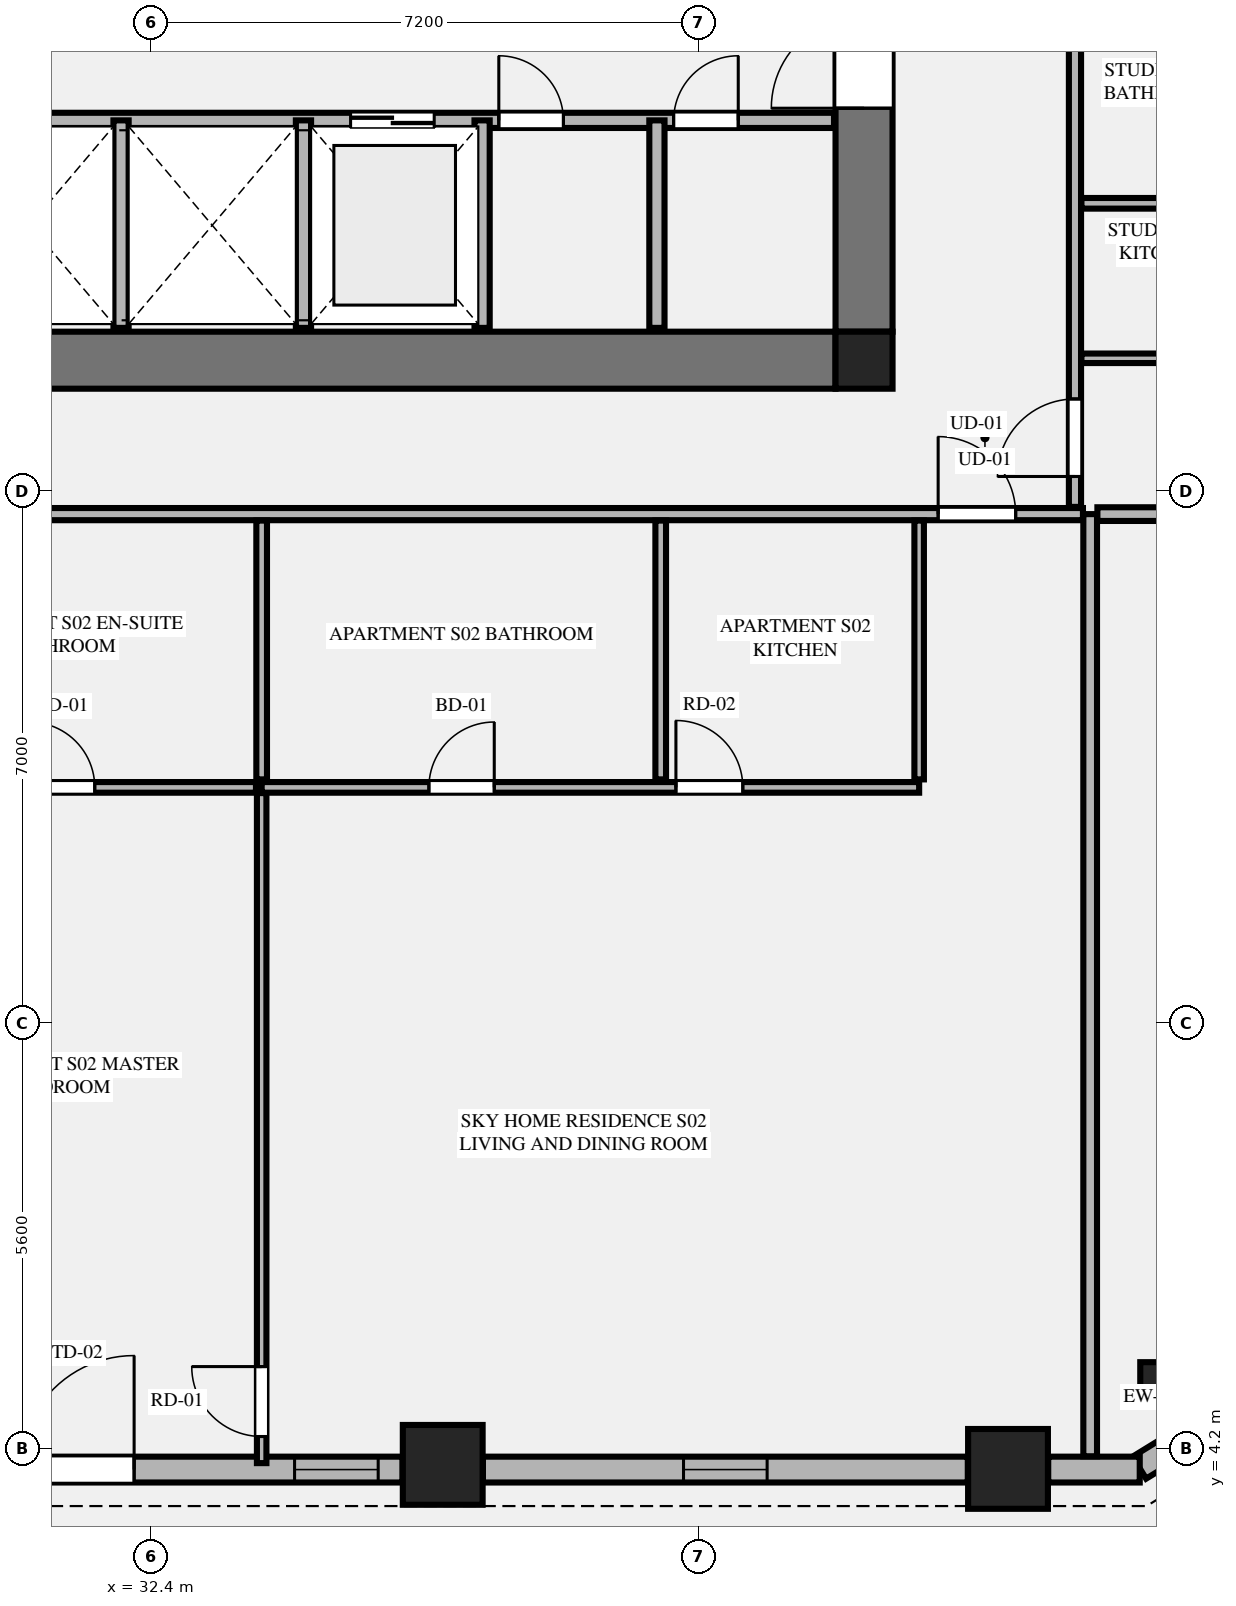
"""IFC4 building model, lengths in metres.
Left out: names, types, materials, properties, quantities, classifications, styles, units other than length and angle.
Written with IfcOpenShell. Run it as: python <this file> out.ifc"""

import sys

from ifc_helpers import new_model, si_unit, direction, frame, frame_2d, origin, origin_2d, place, context, subcontext, project, spatial, rectangle, extrude, element, fill, save


model = new_model("IFC4")
c1 = context("Model", 3, precision=1e-05, world=origin(), true_north=direction((0.0, 1.0)))
c2 = subcontext(c1, "Body", "Model", "MODEL_VIEW")
j1 = project(units=[si_unit("LENGTHUNIT", "METRE"), si_unit("PLANEANGLEUNIT", "RADIAN")], contexts=[c1])
p1 = place(None, origin())
s1 = spatial("IfcSite", under=j1, at=p1, CompositionType="ELEMENT")
p2 = place(p1, origin())
s2 = spatial("IfcBuilding", under=s1, at=p2, CompositionType="ELEMENT")
p3 = place(p2, frame((0.0, 0.0, 98.4)))
s3 = spatial("IfcBuildingStorey", under=s2, at=p3, CompositionType="ELEMENT", Elevation=98.4)
p4 = place(p3, frame((41.775, 18.525, 0.0), z_axis=(0.0, 0.0, 1.0), x_axis=(1.0, 0.0, 0.0)))
e1 = element("IfcColumn", 1, at=p4, inside=s3, PredefinedType="COLUMN", context=c2, shape_type="SweptSolid", body=[
    extrude(rectangle(XDim=0.75, YDim=0.75, at=origin_2d()), origin(), (0.0, 0.0, 1.0), 3.55),
])
p5 = place(p3, frame((23.4, 18.525, 0.0), z_axis=(0.0, 0.0, 1.0), x_axis=(1.0, 0.0, 0.0)))
e2 = element("IfcWall", 2, at=p5, inside=s3, PredefinedType="SHEAR", context=c2, shape_type="SweptSolid", body=[
    extrude(rectangle(XDim=18.0, YDim=0.75, at=frame_2d((9.0, 0.0))), origin(), (0.0, 0.0, 1.0), 3.34),
])
p6 = place(p3, frame((41.775, 18.9, 0.0), z_axis=(0.0, 0.0, 1.0), x_axis=(0.0, 1.0, 0.0)))
e3 = element("IfcWall", 3, at=p6, inside=s3, PredefinedType="SHEAR", context=c2, shape_type="SweptSolid", body=[
    extrude(rectangle(XDim=14.0, YDim=0.75, at=frame_2d((7.0, 0.0))), origin(), (0.0, 0.0, 1.0), 3.34),
])
p7 = place(p6, frame((2.94, 0.0, 0.0)))
e4 = element("IfcOpeningElement", 4, at=p7, cuts=e3, PredefinedType="OPENING", context=c2, shape_type="SweptSolid", body=[
    extrude(rectangle(XDim=1.22, YDim=2.25, at=frame_2d((0.61, 1.125))), frame((0.0, 0.385, 0.0), z_axis=(0.0, -1.0, 0.0), x_axis=(1.0, 0.0, 0.0)), (0.0, 0.0, 1.0), 0.77),
])
for number, where, z_axis, x_axis in (
    (5, (36.232, 3.992, 0.0), (0.0, 0.0, 1.0), (1.0, 0.0, 0.0)),
    (6, (43.669, 3.939, 0.0), (0.0, 0.0, 1.0), (1.0, 0.0, 0.0)),
):
    element("IfcColumn", number, at=place(p3, frame(where, z_axis=z_axis, x_axis=x_axis)), inside=s3, PredefinedType="COLUMN", context=c2, shape_type="SweptSolid", body=[
        extrude(rectangle(XDim=1.05, YDim=1.05, at=origin_2d()), origin(), (0.0, 0.0, 1.0), 3.55),
    ])
p8 = place(p3, frame((45.659, 5.093, 0.0), z_axis=(0.0, 0.0, 1.0), x_axis=(0.865160173452, 0.501495637342, 0.0)))
e7 = element("IfcColumn", 7, at=p8, inside=s3, PredefinedType="PILASTER", context=c2, shape_type="SweptSolid", body=[
    extrude(rectangle(XDim=0.5, YDim=0.35, at=origin_2d()), origin(), (0.0, 0.0, 1.0), 3.55),
])
p9 = place(p3, frame((23.42, 21.68, 0.0), z_axis=(0.0, 0.0, 1.0), x_axis=(1.0, 0.0, 0.0)))
e8 = element("IfcWall", 8, at=p9, inside=s3, PredefinedType="PLUMBINGWALL", context=c2, shape_type="SweptSolid", body=[
    extrude(rectangle(XDim=17.96, YDim=0.2, at=frame_2d((8.98, 0.0))), origin(), (0.0, 0.0, 1.0), 3.34),
])
p10 = place(p9, frame((11.6, 0.0, 0.0)))
e9 = element("IfcOpeningElement", 9, at=p10, cuts=e8, PredefinedType="OPENING", context=c2, shape_type="SweptSolid", body=[
    extrude(rectangle(XDim=1.1, YDim=2.2, at=frame_2d((0.55, 1.1))), frame((0.0, 0.11, 0.0), z_axis=(0.0, -1.0, 0.0), x_axis=(1.0, 0.0, 0.0)), (0.0, 0.0, 1.0), 0.22),
])
p11 = place(p9, frame((1.2, 0.0, 0.0)))
e10 = element("IfcOpeningElement", 10, at=p11, cuts=e8, PredefinedType="OPENING", context=c2, shape_type="SweptSolid", body=[
    extrude(rectangle(XDim=0.85, YDim=2.05, at=frame_2d((0.425, 1.025))), frame((0.0, 0.11, 0.0), z_axis=(0.0, -1.0, 0.0), x_axis=(1.0, 0.0, 0.0)), (0.0, 0.0, 1.0), 0.22),
])
p12 = place(p9, frame((13.55, 0.0, 0.0)))
e11 = element("IfcOpeningElement", 11, at=p12, cuts=e8, PredefinedType="OPENING", context=c2, shape_type="SweptSolid", body=[
    extrude(rectangle(XDim=0.85, YDim=2.05, at=frame_2d((0.425, 1.025))), frame((0.0, 0.11, 0.0), z_axis=(0.0, -1.0, 0.0), x_axis=(1.0, 0.0, 0.0)), (0.0, 0.0, 1.0), 0.22),
])
p13 = place(p9, frame((15.85, 0.0, 0.0)))
e12 = element("IfcOpeningElement", 12, at=p13, cuts=e8, PredefinedType="OPENING", context=c2, shape_type="SweptSolid", body=[
    extrude(rectangle(XDim=0.85, YDim=2.05, at=frame_2d((0.425, 1.025))), frame((0.0, 0.11, 0.0), z_axis=(0.0, -1.0, 0.0), x_axis=(1.0, 0.0, 0.0)), (0.0, 0.0, 1.0), 0.22),
])
for number, where, z_axis, x_axis in (
    (13, (32.0, 18.95, 0.0), (0.0, 0.0, 1.0), (0.0, 1.0, 0.0)),
    (14, (34.4, 18.95, 0.0), (0.0, 0.0, 1.0), (0.0, 1.0, 0.0)),
    (15, (36.75, 18.95, 0.0), (0.0, 0.0, 1.0), (0.0, 1.0, 0.0)),
    (16, (39.05, 18.95, 0.0), (0.0, 0.0, 1.0), (0.0, 1.0, 0.0)),
):
    element("IfcWall", number, at=place(p3, frame(where, z_axis=z_axis, x_axis=x_axis)), inside=s3, PredefinedType="PLUMBINGWALL", context=c2, shape_type="SweptSolid", body=[
        extrude(rectangle(XDim=2.73, YDim=0.2, at=frame_2d((1.365, 0.0))), origin(), (0.0, 0.0, 1.0), 3.34),
    ])
p14 = place(p3, frame((45.397, 3.955, 0.0), z_axis=(0.0, 0.0, 1.0), x_axis=(0.851798915137, 0.523868884523, 0.0)))
e17 = element("IfcWall", 17, at=p14, inside=s3, PredefinedType="STANDARD", context=c2, shape_type="SweptSolid", body=[
    extrude(rectangle(XDim=1.848, YDim=0.34, at=frame_2d((0.924, 0.0))), origin(), (0.0, 0.0, 1.0), 3.34),
])
p15 = place(p3, frame((29.097, 3.93, 0.0), z_axis=(0.0, 0.0, 1.0), x_axis=(1.0, 0.0, 0.0)))
e18 = element("IfcWall", 18, at=p15, inside=s3, PredefinedType="STANDARD", context=c2, shape_type="SweptSolid", body=[
    extrude(rectangle(XDim=6.606, YDim=0.34, at=frame_2d((3.303, 0.0))), origin(), (0.0, 0.0, 1.0), 2.797),
])
p16 = place(p15, frame((1.575, 0.0, 0.0)))
e19 = element("IfcOpeningElement", 19, at=p16, cuts=e18, PredefinedType="OPENING", context=c2, shape_type="SweptSolid", body=[
    extrude(rectangle(XDim=1.5, YDim=2.3, at=frame_2d((0.75, 1.15))), frame((0.0, 0.18, 0.0), z_axis=(0.0, -1.0, 0.0), x_axis=(1.0, 0.0, 0.0)), (0.0, 0.0, 1.0), 0.36),
])
p17 = place(p15, frame((5.186, 0.0, 0.75)))
e20 = element("IfcOpeningElement", 20, at=p17, cuts=e18, PredefinedType="OPENING", context=c2, shape_type="SweptSolid", body=[
    extrude(rectangle(XDim=1.1, YDim=1.897, at=frame_2d((0.55, 0.948))), frame((0.0, 0.18, 0.0), z_axis=(0.0, -1.0, 0.0), x_axis=(1.0, 0.0, 0.0)), (0.0, 0.0, 1.0), 0.36),
])
p18 = place(p3, frame((36.761, 3.93, 0.0), z_axis=(0.0, 0.0, 1.0), x_axis=(1.0, 0.0, 0.0)))
e21 = element("IfcWall", 21, at=p18, inside=s3, PredefinedType="STANDARD", context=c2, shape_type="SweptSolid", body=[
    extrude(rectangle(XDim=6.379, YDim=0.34, at=frame_2d((3.189, 0.0))), origin(), (0.0, 0.0, 1.0), 2.797),
])
p19 = place(p18, frame((2.639, 0.0, 0.75)))
e22 = element("IfcOpeningElement", 22, at=p19, cuts=e21, PredefinedType="OPENING", context=c2, shape_type="SweptSolid", body=[
    extrude(rectangle(XDim=1.1, YDim=1.897, at=frame_2d((0.55, 0.948))), frame((0.0, 0.18, 0.0), z_axis=(0.0, -1.0, 0.0), x_axis=(1.0, 0.0, 0.0)), (0.0, 0.0, 1.0), 0.36),
])
p20 = place(p3, frame((44.198, 3.93, 0.0), z_axis=(0.0, 0.0, 1.0), x_axis=(1.0, 0.0, 0.0)))
e23 = element("IfcWall", 23, at=p20, inside=s3, PredefinedType="STANDARD", context=c2, shape_type="SweptSolid", body=[
    extrude(rectangle(XDim=1.204, YDim=0.34, at=frame_2d((0.602, 0.0))), origin(), (0.0, 0.0, 1.0), 3.34),
])
p21 = place(p3, frame((44.75, 4.105, 0.0), z_axis=(0.0, 0.0, 1.0), x_axis=(0.0, 1.0, 0.0)))
e24 = element("IfcWall", 24, at=p21, inside=s3, PredefinedType="PARTITIONING", context=c2, shape_type="SweptSolid", body=[
    extrude(rectangle(XDim=12.395, YDim=0.18, at=frame_2d((6.198, 0.0))), origin(), (0.0, 0.0, 1.0), 3.34),
])
p22 = place(p3, frame((28.663, 16.5, 0.0), z_axis=(0.0, 0.0, 1.0), x_axis=(1.0, 0.0, 0.0)))
e25 = element("IfcWall", 25, at=p22, inside=s3, PredefinedType="PARTITIONING", context=c2, shape_type="SweptSolid", body=[
    extrude(rectangle(XDim=15.992, YDim=0.16, at=frame_2d((7.996, 0.0))), origin(), (0.0, 0.0, 1.0), 3.34),
])
p23 = place(p22, frame((14.087, 0.0, 0.0)))
e26 = element("IfcOpeningElement", 26, at=p23, cuts=e25, PredefinedType="OPENING", context=c2, shape_type="SweptSolid", body=[
    extrude(rectangle(XDim=1.02, YDim=2.25, at=frame_2d((0.51, 1.125))), frame((0.0, 0.09, 0.0), z_axis=(0.0, -1.0, 0.0), x_axis=(1.0, 0.0, 0.0)), (0.0, 0.0, 1.0), 0.18),
])
p24 = place(p3, frame((42.5, 13.01, 0.0), z_axis=(0.0, 0.0, 1.0), x_axis=(0.0, 1.0, 0.0)))
e27 = element("IfcWall", 27, at=p24, inside=s3, PredefinedType="PARTITIONING", context=c2, shape_type="SweptSolid", body=[
    extrude(rectangle(XDim=3.405, YDim=0.125, at=frame_2d((1.703, 0.0))), origin(), (0.0, 0.0, 1.0), 2.722),
])
p25 = place(p3, frame((33.85, 12.905, 0.0), z_axis=(0.0, 0.0, 1.0), x_axis=(1.0, 0.0, 0.0)))
e28 = element("IfcWall", 28, at=p25, inside=s3, PredefinedType="PLUMBINGWALL", context=c2, shape_type="SweptSolid", body=[
    extrude(rectangle(XDim=8.65, YDim=0.14, at=frame_2d((4.325, 0.0))), origin(), (0.0, 0.0, 1.0), 3.34),
])
p26 = place(p25, frame((2.2, 0.0, 0.0)))
e29 = element("IfcOpeningElement", 29, at=p26, cuts=e28, PredefinedType="OPENING", context=c2, shape_type="SweptSolid", body=[
    extrude(rectangle(XDim=0.86, YDim=2.1, at=frame_2d((0.43, 1.05))), frame((0.0, 0.08, 0.0), z_axis=(0.0, -1.0, 0.0), x_axis=(1.0, 0.0, 0.0)), (0.0, 0.0, 1.0), 0.16),
])
p27 = place(p25, frame((5.45, 0.0, 0.0)))
e30 = element("IfcOpeningElement", 30, at=p27, cuts=e28, PredefinedType="OPENING", context=c2, shape_type="SweptSolid", body=[
    extrude(rectangle(XDim=0.88, YDim=2.15, at=frame_2d((0.44, 1.075))), frame((0.0, 0.08, 0.0), z_axis=(0.0, -1.0, 0.0), x_axis=(1.0, 0.0, 0.0)), (0.0, 0.0, 1.0), 0.16),
])
p28 = place(p3, frame((28.663, 12.905, 0.0), z_axis=(0.0, 0.0, 1.0), x_axis=(1.0, 0.0, 0.0)))
e31 = element("IfcWall", 31, at=p28, inside=s3, PredefinedType="PLUMBINGWALL", context=c2, shape_type="SweptSolid", body=[
    extrude(rectangle(XDim=5.112, YDim=0.14, at=frame_2d((2.556, 0.0))), origin(), (0.0, 0.0, 1.0), 3.34),
])
p29 = place(p28, frame((2.131, 0.0, 0.0)))
e32 = element("IfcOpeningElement", 32, at=p29, cuts=e31, PredefinedType="OPENING", context=c2, shape_type="SweptSolid", body=[
    extrude(rectangle(XDim=0.86, YDim=2.1, at=frame_2d((0.43, 1.05))), frame((0.0, 0.08, 0.0), z_axis=(0.0, -1.0, 0.0), x_axis=(1.0, 0.0, 0.0)), (0.0, 0.0, 1.0), 0.16),
])
for number, where, z_axis, x_axis in (
    (33, (39.1, 13.01, 0.0), (0.0, 0.0, 1.0), (0.0, 1.0, 0.0)),
    (34, (33.85, 13.01, 0.0), (0.0, 0.0, 1.0), (0.0, 1.0, 0.0)),
):
    element("IfcWall", number, at=place(p3, frame(where, z_axis=z_axis, x_axis=x_axis)), inside=s3, PredefinedType="PLUMBINGWALL", context=c2, shape_type="SweptSolid", body=[
        extrude(rectangle(XDim=3.405, YDim=0.14, at=frame_2d((1.703, 0.0))), origin(), (0.0, 0.0, 1.0), 3.34),
    ])
p30 = place(p3, frame((33.85, 4.015, 0.0), z_axis=(0.0, 0.0, 1.0), x_axis=(0.0, 1.0, 0.0)))
e35 = element("IfcWall", 35, at=p30, inside=s3, PredefinedType="PARTITIONING", context=c2, shape_type="SweptSolid", body=[
    extrude(rectangle(XDim=8.815, YDim=0.125, at=frame_2d((4.408, 0.0))), origin(), (0.0, 0.0, 1.0), 3.34),
])
p31 = place(p30, frame((0.35, 0.0, 0.0)))
e36 = element("IfcOpeningElement", 36, at=p31, cuts=e35, PredefinedType="OPENING", context=c2, shape_type="SweptSolid", body=[
    extrude(rectangle(XDim=0.92, YDim=2.15, at=frame_2d((0.46, 1.075))), frame((0.0, 0.073, 0.0), z_axis=(0.0, -1.0, 0.0), x_axis=(1.0, 0.0, 0.0)), (0.0, 0.0, 1.0), 0.145),
])
p32 = place(p3, frame((44.845, 16.5, 0.0), z_axis=(0.0, 0.0, 1.0), x_axis=(1.0, 0.0, 0.0)))
e37 = element("IfcWall", 37, at=p32, inside=s3, PredefinedType="PARTITIONING", context=c2, shape_type="SweptSolid", body=[
    extrude(rectangle(XDim=7.77, YDim=0.18, at=frame_2d((3.885, 0.0))), origin(), (0.0, 0.0, 1.0), 3.34),
])
p33 = place(p3, frame((44.55, 16.595, 0.0), z_axis=(0.0, 0.0, 1.0), x_axis=(0.0, 1.0, 0.0)))
e38 = element("IfcWall", 38, at=p33, inside=s3, PredefinedType="PARTITIONING", context=c2, shape_type="SweptSolid", body=[
    extrude(rectangle(XDim=6.202, YDim=0.16, at=frame_2d((3.101, 0.0))), origin(), (0.0, 0.0, 1.0), 3.34),
])
p34 = place(p33, frame((0.4, 0.0, 0.0)))
e39 = element("IfcOpeningElement", 39, at=p34, cuts=e38, PredefinedType="OPENING", context=c2, shape_type="SweptSolid", body=[
    extrude(rectangle(XDim=1.02, YDim=2.25, at=frame_2d((0.51, 1.125))), frame((0.0, 0.09, 0.0), z_axis=(0.0, -1.0, 0.0), x_axis=(1.0, 0.0, 0.0)), (0.0, 0.0, 1.0), 0.18),
])
p35 = place(p3, frame((44.635, 18.55, 0.0), z_axis=(0.0, 0.0, 1.0), x_axis=(1.0, 0.0, 0.0)))
e40 = element("IfcWall", 40, at=p35, inside=s3, PredefinedType="PARTITIONING", context=c2, shape_type="SweptSolid", body=[
    extrude(rectangle(XDim=2.38, YDim=0.125, at=frame_2d((1.19, 0.0))), origin(), (0.0, 0.0, 1.0), 2.722),
])
p36 = place(p3, frame((44.635, 20.589, 0.0), z_axis=(0.0, 0.0, 1.0), x_axis=(1.0, 0.0, 0.0)))
e41 = element("IfcWall", 41, at=p36, inside=s3, PredefinedType="PLUMBINGWALL", context=c2, shape_type="SweptSolid", body=[
    extrude(rectangle(XDim=2.38, YDim=0.14, at=frame_2d((1.19, 0.0))), origin(), (0.0, 0.0, 1.0), 3.34),
])
p37 = place(p7, origin())
e42 = element("IfcDoor", 42, at=p37, inside=s3, OperationType="SINGLE_SWING_LEFT", PredefinedType="DOOR", context=c2, shape_type="SweptSolid", body=[
    extrude(rectangle(XDim=1.22, YDim=2.25, at=frame_2d((0.61, 1.125))), frame((0.0, 0.025, 0.0), z_axis=(0.0, -1.0, 0.0), x_axis=(1.0, 0.0, 0.0)), (0.0, 0.0, 1.0), 0.05),
])
fill(e4, e42)
p38 = place(p10, origin())
e43 = element("IfcDoor", 43, at=p38, inside=s3, OperationType="DOUBLE_DOOR_SLIDING", PredefinedType="DOOR", context=c2, shape_type="SweptSolid", body=[
    extrude(rectangle(XDim=1.1, YDim=2.2, at=frame_2d((0.55, 1.1))), frame((0.0, 0.025, 0.0), z_axis=(0.0, -1.0, 0.0), x_axis=(1.0, 0.0, 0.0)), (0.0, 0.0, 1.0), 0.05),
])
fill(e9, e43)
p39 = place(p12, origin())
e44 = element("IfcDoor", 44, at=p39, inside=s3, OperationType="SINGLE_SWING_LEFT", PredefinedType="DOOR", context=c2, shape_type="SweptSolid", body=[
    extrude(rectangle(XDim=0.85, YDim=2.05, at=frame_2d((0.425, 1.025))), frame((0.0, 0.025, 0.0), z_axis=(0.0, -1.0, 0.0), x_axis=(1.0, 0.0, 0.0)), (0.0, 0.0, 1.0), 0.05),
])
fill(e11, e44)
p40 = place(p13, origin())
e45 = element("IfcDoor", 45, at=p40, inside=s3, OperationType="SINGLE_SWING_RIGHT", PredefinedType="DOOR", context=c2, shape_type="SweptSolid", body=[
    extrude(rectangle(XDim=0.85, YDim=2.05, at=frame_2d((0.425, 1.025))), frame((0.0, 0.025, 0.0), z_axis=(0.0, -1.0, 0.0), x_axis=(1.0, 0.0, 0.0)), (0.0, 0.0, 1.0), 0.05),
])
fill(e12, e45)
p41 = place(p16, origin())
e46 = element("IfcDoor", 46, at=p41, inside=s3, OperationType="SINGLE_SWING_RIGHT", PredefinedType="DOOR", context=c2, shape_type="SweptSolid", body=[
    extrude(rectangle(XDim=1.5, YDim=2.3, at=frame_2d((0.75, 1.15))), frame((0.0, 0.025, 0.0), z_axis=(0.0, -1.0, 0.0), x_axis=(1.0, 0.0, 0.0)), (0.0, 0.0, 1.0), 0.05),
])
fill(e19, e46)
p42 = place(p19, origin())
e47 = element("IfcWindow", 47, at=p42, inside=s3, PartitioningType="SINGLE_PANEL", PredefinedType="WINDOW", context=c2, shape_type="SweptSolid", body=[
    extrude(rectangle(XDim=1.1, YDim=1.897, at=frame_2d((0.55, 0.948))), frame((0.0, 0.03, 0.0), z_axis=(0.0, -1.0, 0.0), x_axis=(1.0, 0.0, 0.0)), (0.0, 0.0, 1.0), 0.06),
])
fill(e22, e47)
p43 = place(p26, origin())
e48 = element("IfcDoor", 48, at=p43, inside=s3, OperationType="SINGLE_SWING_RIGHT", PredefinedType="DOOR", context=c2, shape_type="SweptSolid", body=[
    extrude(rectangle(XDim=0.86, YDim=2.1, at=frame_2d((0.43, 1.05))), frame((0.0, 0.025, 0.0), z_axis=(0.0, -1.0, 0.0), x_axis=(1.0, 0.0, 0.0)), (0.0, 0.0, 1.0), 0.05),
])
fill(e29, e48)
p44 = place(p29, origin())
e49 = element("IfcDoor", 49, at=p44, inside=s3, OperationType="SINGLE_SWING_LEFT", PredefinedType="DOOR", context=c2, shape_type="SweptSolid", body=[
    extrude(rectangle(XDim=0.86, YDim=2.1, at=frame_2d((0.43, 1.05))), frame((0.0, 0.025, 0.0), z_axis=(0.0, -1.0, 0.0), x_axis=(1.0, 0.0, 0.0)), (0.0, 0.0, 1.0), 0.05),
])
fill(e32, e49)
p45 = place(p23, origin())
e50 = element("IfcDoor", 50, at=p45, inside=s3, OperationType="SINGLE_SWING_LEFT", PredefinedType="DOOR", context=c2, shape_type="SweptSolid", body=[
    extrude(rectangle(XDim=1.02, YDim=2.25, at=frame_2d((0.51, 1.125))), frame((0.0, 0.025, 0.0), z_axis=(0.0, -1.0, 0.0), x_axis=(1.0, 0.0, 0.0)), (0.0, 0.0, 1.0), 0.05),
])
fill(e26, e50)
p46 = place(p27, origin())
e51 = element("IfcDoor", 51, at=p46, inside=s3, OperationType="SINGLE_SWING_LEFT", PredefinedType="DOOR", context=c2, shape_type="SweptSolid", body=[
    extrude(rectangle(XDim=0.88, YDim=2.15, at=frame_2d((0.44, 1.075))), frame((0.0, 0.025, 0.0), z_axis=(0.0, -1.0, 0.0), x_axis=(1.0, 0.0, 0.0)), (0.0, 0.0, 1.0), 0.05),
])
fill(e30, e51)
p47 = place(p31, origin())
e52 = element("IfcDoor", 52, at=p47, inside=s3, OperationType="SINGLE_SWING_RIGHT", PredefinedType="DOOR", context=c2, shape_type="SweptSolid", body=[
    extrude(rectangle(XDim=0.92, YDim=2.15, at=frame_2d((0.46, 1.075))), frame((0.0, 0.025, 0.0), z_axis=(0.0, -1.0, 0.0), x_axis=(1.0, 0.0, 0.0)), (0.0, 0.0, 1.0), 0.05),
])
fill(e36, e52)
p48 = place(p34, origin())
e53 = element("IfcDoor", 53, at=p48, inside=s3, OperationType="SINGLE_SWING_LEFT", PredefinedType="DOOR", context=c2, shape_type="SweptSolid", body=[
    extrude(rectangle(XDim=1.02, YDim=2.25, at=frame_2d((0.51, 1.125))), frame((0.0, 0.025, 0.0), z_axis=(0.0, -1.0, 0.0), x_axis=(1.0, 0.0, 0.0)), (0.0, 0.0, 1.0), 0.05),
])
fill(e39, e53)
p49 = place(p17, origin())
e54 = element("IfcWindow", 54, at=p49, inside=s3, PartitioningType="SINGLE_PANEL", PredefinedType="WINDOW", context=c2, shape_type="SweptSolid", body=[
    extrude(rectangle(XDim=1.1, YDim=1.897, at=frame_2d((0.55, 0.948))), frame((0.0, 0.03, 0.0), z_axis=(0.0, -1.0, 0.0), x_axis=(1.0, 0.0, 0.0)), (0.0, 0.0, 1.0), 0.06),
])
fill(e20, e54)
save(model, sys.argv[1])
